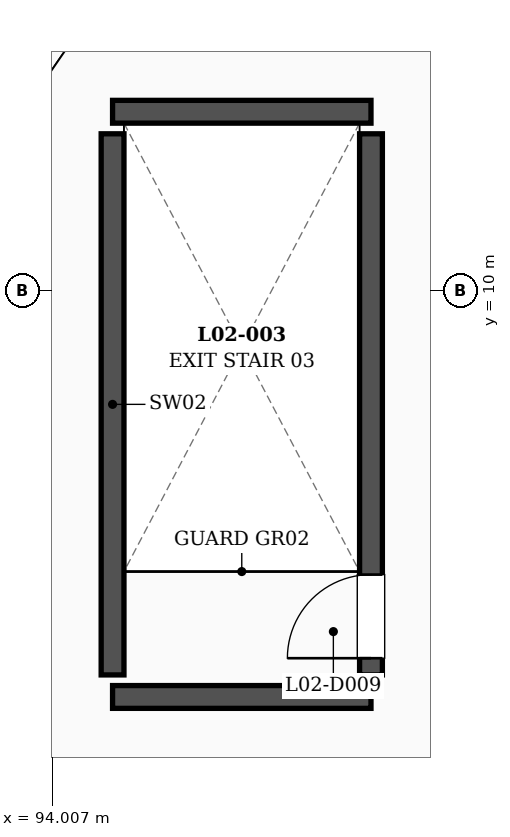
"""IFC4 building model, lengths in metres.
Left out: names, types, materials, properties, quantities, classifications, styles, units other than length and angle.
Written with IfcOpenShell. Run it as: python <this file> out.ifc"""

import sys

from ifc_helpers import new_model, si_unit, direction, frame, frame_2d, origin, place, context, subcontext, project, spatial, rectangle, extrude, element, fill, save


model = new_model("IFC4")
c1 = context("Model", 3, precision=1e-05, world=origin(), true_north=direction((0.0, 1.0)))
c2 = subcontext(c1, "Body", "Model", "MODEL_VIEW")
j1 = project(units=[si_unit("LENGTHUNIT", "METRE"), si_unit("PLANEANGLEUNIT", "RADIAN")], contexts=[c1])
p1 = place(None, origin())
s1 = spatial("IfcSite", under=j1, at=p1, CompositionType="ELEMENT")
p2 = place(p1, origin())
s2 = spatial("IfcBuilding", under=s1, at=p2, CompositionType="ELEMENT")
p3 = place(p2, frame((0.0, 0.0, 10.8)))
s3 = spatial("IfcBuildingStorey", under=s2, at=p3, CompositionType="ELEMENT", Elevation=10.8)
for number, where, z_axis, x_axis in (
    (1, (94.8, 4.65, 0.0), (0.0, 0.0, 1.0), (1.0, 0.0, 0.0)),
    (2, (94.8, 12.35, 0.0), (0.0, 0.0, 1.0), (1.0, 0.0, 0.0)),
):
    element("IfcWall", number, at=place(p3, frame(where, z_axis=z_axis, x_axis=x_axis)), inside=s3, PredefinedType="SHEAR", context=c2, shape_type="SweptSolid", body=[
        extrude(rectangle(XDim=3.4, YDim=0.3, at=frame_2d((1.7, 0.0))), origin(), (0.0, 0.0, 1.0), 3.98),
    ])
p4 = place(p3, frame((94.8, 4.94, 0.0), z_axis=(0.0, 0.0, 1.0), x_axis=(0.0, 1.0, 0.0)))
e3 = element("IfcWall", 3, at=p4, inside=s3, PredefinedType="SHEAR", context=c2, shape_type="SweptSolid", body=[
    extrude(rectangle(XDim=7.12, YDim=0.3, at=frame_2d((3.56, 0.0))), origin(), (0.0, 0.0, 1.0), 3.98),
])
p5 = place(p3, frame((98.2, 4.94, 0.0), z_axis=(0.0, 0.0, 1.0), x_axis=(0.0, 1.0, 0.0)))
e4 = element("IfcWall", 4, at=p5, inside=s3, PredefinedType="SHEAR", context=c2, shape_type="SweptSolid", body=[
    extrude(rectangle(XDim=7.12, YDim=0.3, at=frame_2d((3.56, 0.0))), origin(), (0.0, 0.0, 1.0), 3.98),
])
p6 = place(p5, frame((0.22, 0.0, 0.0)))
e5 = element("IfcOpeningElement", 5, at=p6, cuts=e4, PredefinedType="OPENING", context=c2, shape_type="SweptSolid", body=[
    extrude(rectangle(XDim=1.1, YDim=2.2, at=frame_2d((0.55, 1.1))), frame((0.0, 0.16, 0.0), z_axis=(0.0, -1.0, 0.0), x_axis=(1.0, 0.0, 0.0)), (0.0, 0.0, 1.0), 0.32),
])
p7 = place(p3, frame((98.104, 1.955, 0.0), z_axis=(0.0, 0.0, 1.0), x_axis=(-0.951831028097, 0.306623048632, 0.0)))
e6 = element("IfcWall", 6, at=p7, inside=s3, PredefinedType="PARTITIONING", context=c2, shape_type="SweptSolid", body=[
    extrude(rectangle(XDim=9.487, YDim=0.21, at=frame_2d((4.744, 0.0))), origin(), (0.0, 0.0, 1.0), 2.55),
])
p8 = place(p6, origin())
e7 = element("IfcDoor", 7, at=p8, inside=s3, OperationType="SINGLE_SWING_LEFT", PredefinedType="DOOR", context=c2, shape_type="SweptSolid", body=[
    extrude(rectangle(XDim=1.1, YDim=2.2, at=frame_2d((0.55, 1.1))), frame((0.0, 0.025, 0.0), z_axis=(0.0, -1.0, 0.0), x_axis=(1.0, 0.0, 0.0)), (0.0, 0.0, 1.0), 0.05),
])
fill(e5, e7)
save(model, sys.argv[1])
